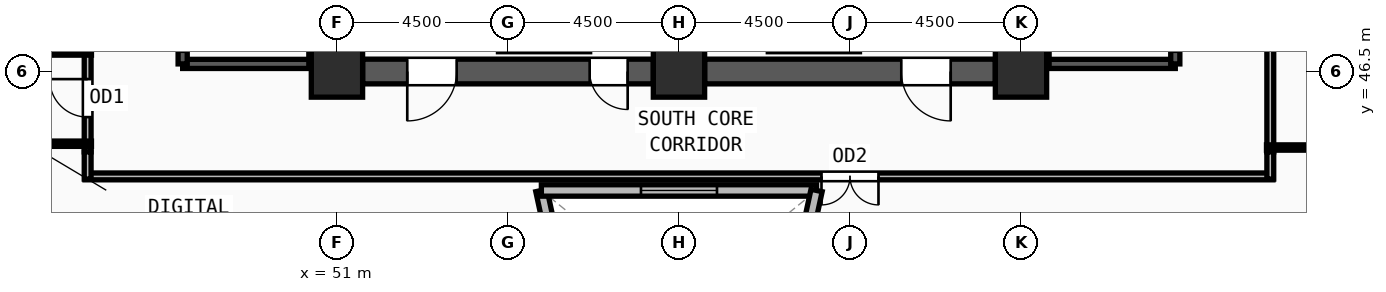
"""IFC4 building model, lengths in metres.
Left out: names, types, materials, properties, quantities, classifications, styles, units other than length and angle.
Written with IfcOpenShell. Run it as: python <this file> out.ifc"""

import sys

from ifc_helpers import new_model, si_unit, direction, frame, frame_2d, origin, origin_2d, place, context, subcontext, project, spatial, rectangle, extrude, source, transform, mapped, element, fill, save


model = new_model("IFC4")
c1 = context("Model", 3, precision=1e-05, world=origin(), true_north=direction((0.0, 1.0)))
c2 = subcontext(c1, "Body", "Model", "MODEL_VIEW")
j1 = project(units=[si_unit("LENGTHUNIT", "METRE"), si_unit("PLANEANGLEUNIT", "RADIAN")], contexts=[c1])
p1 = place(None, origin())
s1 = spatial("IfcSite", under=j1, at=p1, CompositionType="ELEMENT")
p2 = place(p1, origin())
s2 = spatial("IfcBuilding", under=s1, at=p2, CompositionType="ELEMENT")
p3 = place(p2, frame((0.0, 0.0, 258.75)))
s3 = spatial("IfcBuildingStorey", under=s2, at=p3, CompositionType="ELEMENT", Elevation=258.75)
m1 = source(origin(), c2, "Body", "SweptSolid", [
    extrude(rectangle(XDim=1.35, YDim=1.35, at=origin_2d()), origin(), (0.0, 0.0, 1.0), 3.75),
])
for number, where, z_axis, x_axis in (
    (1, (51.0, 46.5, 0.0), (0.0, 0.0, 1.0), (1.0, 0.0, 0.0)),
    (2, (60.0, 46.5, 0.0), (0.0, 0.0, 1.0), (1.0, 0.0, 0.0)),
    (3, (69.0, 46.5, 0.0), (0.0, 0.0, 1.0), (1.0, 0.0, 0.0)),
):
    element("IfcColumn", number, at=place(p3, frame(where, z_axis=z_axis, x_axis=x_axis)), inside=s3, PredefinedType="COLUMN", context=c2, shape_type="MappedRepresentation", body=[
        mapped(m1, transform((0.0, 0.0, 0.0), x_axis=(1.0, 0.0, 0.0), y_axis=(0.0, 1.0, 0.0), z_axis=(0.0, 0.0, 1.0), scale=1.0)),
    ])
p4 = place(p3, frame((39.075, 44.026, 0.0), z_axis=(0.0, 0.0, 1.0), x_axis=(0.554862422202, -0.83194212084, 0.0)))
e4 = element("IfcWall", 4, at=p4, inside=s3, PredefinedType="SOLIDWALL", context=c2, shape_type="SweptSolid", body=[
    extrude(rectangle(XDim=27.782, YDim=0.38, at=frame_2d((13.891, 0.0))), origin(), (0.0, 0.0, 1.0), 3.57),
])
m2 = source(origin(), c2, "Body", "SweptSolid", [
    extrude(rectangle(XDim=1.5, YDim=1.9, at=frame_2d((0.75, 0.95))), frame((0.0, 0.2, 0.0), z_axis=(0.0, -1.0, 0.0), x_axis=(1.0, 0.0, 0.0)), (0.0, 0.0, 1.0), 0.4),
])
p5 = place(p4, frame((6.195, 0.0, 0.55)))
e5 = element("IfcOpeningElement", 5, at=p5, cuts=e4, PredefinedType="OPENING", context=c2, shape_type="MappedRepresentation", body=[
    mapped(m2, transform((0.0, 0.0, 0.0), x_axis=(1.0, 0.0, 0.0), y_axis=(0.0, 1.0, 0.0), z_axis=(0.0, 0.0, 1.0), scale=1.0)),
])
p6 = place(p4, frame((13.141, 0.0, 0.55)))
e6 = element("IfcOpeningElement", 6, at=p6, cuts=e4, PredefinedType="OPENING", context=c2, shape_type="MappedRepresentation", body=[
    mapped(m2, transform((0.0, 0.0, 0.0), x_axis=(1.0, 0.0, 0.0), y_axis=(0.0, 1.0, 0.0), z_axis=(0.0, 0.0, 1.0), scale=1.0)),
])
p7 = place(p4, frame((20.086, 0.0, 0.55)))
e7 = element("IfcOpeningElement", 7, at=p7, cuts=e4, PredefinedType="OPENING", context=c2, shape_type="MappedRepresentation", body=[
    mapped(m2, transform((0.0, 0.0, 0.0), x_axis=(1.0, 0.0, 0.0), y_axis=(0.0, 1.0, 0.0), z_axis=(0.0, 0.0, 1.0), scale=1.0)),
])
p8 = place(p3, frame((68.325, 46.5, 0.0), z_axis=(0.0, 0.0, 1.0), x_axis=(-1.0, 0.0, 0.0)))
e8 = element("IfcWall", 8, at=p8, inside=s3, PredefinedType="SHEAR", context=c2, shape_type="SweptSolid", body=[
    extrude(rectangle(XDim=7.65, YDim=0.65, at=frame_2d((3.825, 0.0))), origin(), (0.0, 0.0, 1.0), 3.57),
])
m3 = source(origin(), c2, "Body", "SweptSolid", [
    extrude(rectangle(XDim=1.3, YDim=2.2, at=frame_2d((0.65, 1.1))), frame((0.0, 0.335, 0.0), z_axis=(0.0, -1.0, 0.0), x_axis=(1.0, 0.0, 0.0)), (0.0, 0.0, 1.0), 0.67),
])
p9 = place(p8, frame((1.175, 0.0, 0.0)))
e9 = element("IfcOpeningElement", 9, at=p9, cuts=e8, PredefinedType="OPENING", context=c2, shape_type="MappedRepresentation", body=[
    mapped(m3, transform((0.0, 0.0, 0.0), x_axis=(1.0, 0.0, 0.0), y_axis=(0.0, 1.0, 0.0), z_axis=(0.0, 0.0, 1.0), scale=1.0)),
])
p10 = place(p3, frame((59.325, 46.5, 0.0), z_axis=(0.0, 0.0, 1.0), x_axis=(-1.0, 0.0, 0.0)))
e10 = element("IfcWall", 10, at=p10, inside=s3, PredefinedType="SHEAR", context=c2, shape_type="SweptSolid", body=[
    extrude(rectangle(XDim=7.65, YDim=0.65, at=frame_2d((3.825, 0.0))), origin(), (0.0, 0.0, 1.0), 3.57),
])
p11 = place(p10, frame((5.175, 0.0, 0.0)))
e11 = element("IfcOpeningElement", 11, at=p11, cuts=e10, PredefinedType="OPENING", context=c2, shape_type="MappedRepresentation", body=[
    mapped(m3, transform((0.0, 0.0, 0.0), x_axis=(1.0, 0.0, 0.0), y_axis=(0.0, 1.0, 0.0), z_axis=(0.0, 0.0, 1.0), scale=1.0)),
])
m4 = source(origin(), c2, "Body", "SweptSolid", [
    extrude(rectangle(XDim=1.0, YDim=2.2, at=frame_2d((0.5, 1.1))), frame((0.0, 0.335, 0.0), z_axis=(0.0, -1.0, 0.0), x_axis=(1.0, 0.0, 0.0)), (0.0, 0.0, 1.0), 0.67),
])
p12 = place(p10, frame((0.675, 0.0, 0.0)))
e12 = element("IfcOpeningElement", 12, at=p12, cuts=e10, PredefinedType="OPENING", context=c2, shape_type="MappedRepresentation", body=[
    mapped(m4, transform((0.0, 0.0, 0.0), x_axis=(1.0, 0.0, 0.0), y_axis=(0.0, 1.0, 0.0), z_axis=(0.0, 0.0, 1.0), scale=1.0)),
])
p13 = place(p3, frame((46.94, 46.7, 0.0), z_axis=(0.0, 0.0, 1.0), x_axis=(1.0, 0.0, 0.0)))
e13 = element("IfcWall", 13, at=p13, inside=s3, PredefinedType="SOLIDWALL", context=c2, shape_type="SweptSolid", body=[
    extrude(rectangle(XDim=3.44, YDim=0.24, at=frame_2d((1.72, 0.0))), origin(), (0.0, 0.0, 1.0), 3.57),
])
p14 = place(p3, frame((50.38, 46.7, 0.0), z_axis=(0.0, 0.0, 1.0), x_axis=(0.0, 1.0, 0.0)))
e14 = element("IfcWall", 14, at=p14, inside=s3, PredefinedType="SOLIDWALL", context=c2, shape_type="SweptSolid", body=[
    extrude(rectangle(XDim=7.82, YDim=0.24, at=frame_2d((3.91, 0.0))), origin(), (0.0, 0.0, 1.0), 3.57),
])
p15 = place(p3, frame((46.94, 54.52, 0.0), z_axis=(0.0, 0.0, 1.0), x_axis=(0.0, -1.0, 0.0)))
e15 = element("IfcWall", 15, at=p15, inside=s3, PredefinedType="SOLIDWALL", context=c2, shape_type="SweptSolid", body=[
    extrude(rectangle(XDim=7.82, YDim=0.24, at=frame_2d((3.91, 0.0))), origin(), (0.0, 0.0, 1.0), 3.57),
])
m5 = source(origin(), c2, "Body", "SweptSolid", [
    extrude(rectangle(XDim=1.2, YDim=2.2, at=frame_2d((0.6, 1.1))), frame((0.0, 0.13, 0.0), z_axis=(0.0, -1.0, 0.0), x_axis=(1.0, 0.0, 0.0)), (0.0, 0.0, 1.0), 0.26),
])
p16 = place(p15, frame((6.3, 0.0, 0.0)))
e16 = element("IfcOpeningElement", 16, at=p16, cuts=e15, PredefinedType="OPENING", context=c2, shape_type="MappedRepresentation", body=[
    mapped(m5, transform((0.0, 0.0, 0.0), x_axis=(1.0, 0.0, 0.0), y_axis=(0.0, 1.0, 0.0), z_axis=(0.0, 0.0, 1.0), scale=1.0)),
])
p17 = place(p3, frame((69.62, 46.7, 0.0), z_axis=(0.0, 0.0, 1.0), x_axis=(1.0, 0.0, 0.0)))
e17 = element("IfcWall", 17, at=p17, inside=s3, PredefinedType="SOLIDWALL", context=c2, shape_type="SweptSolid", body=[
    extrude(rectangle(XDim=3.44, YDim=0.24, at=frame_2d((1.72, 0.0))), origin(), (0.0, 0.0, 1.0), 3.57),
])
p18 = place(p3, frame((73.06, 46.7, 0.0), z_axis=(0.0, 0.0, 1.0), x_axis=(0.0, 1.0, 0.0)))
e18 = element("IfcWall", 18, at=p18, inside=s3, PredefinedType="SOLIDWALL", context=c2, shape_type="SweptSolid", body=[
    extrude(rectangle(XDim=7.82, YDim=0.24, at=frame_2d((3.91, 0.0))), origin(), (0.0, 0.0, 1.0), 3.57),
])
p19 = place(p18, frame((0.32, 0.0, 0.0)))
e19 = element("IfcOpeningElement", 19, at=p19, cuts=e18, PredefinedType="OPENING", context=c2, shape_type="MappedRepresentation", body=[
    mapped(m5, transform((0.0, 0.0, 0.0), x_axis=(1.0, 0.0, 0.0), y_axis=(0.0, 1.0, 0.0), z_axis=(0.0, 0.0, 1.0), scale=1.0)),
])
p20 = place(p3, frame((69.62, 54.52, 0.0), z_axis=(0.0, 0.0, 1.0), x_axis=(0.0, -1.0, 0.0)))
e20 = element("IfcWall", 20, at=p20, inside=s3, PredefinedType="SOLIDWALL", context=c2, shape_type="SweptSolid", body=[
    extrude(rectangle(XDim=7.82, YDim=0.24, at=frame_2d((3.91, 0.0))), origin(), (0.0, 0.0, 1.0), 3.57),
])
p21 = place(p3, frame((57.646, 37.508, 0.0), z_axis=(0.0, 0.0, 1.0), x_axis=(-0.211271830319, 0.977427344468, 0.0)))
e21 = element("IfcWall", 21, at=p21, inside=s3, PredefinedType="SOLIDWALL", context=c2, shape_type="SweptSolid", body=[
    extrude(rectangle(XDim=5.998, YDim=0.3, at=frame_2d((2.999, 0.0))), origin(), (0.0, 0.0, 1.0), 3.57),
])
m6 = source(origin(), c2, "Body", "SweptSolid", [
    extrude(rectangle(XDim=2.0, YDim=1.9, at=frame_2d((1.0, 0.95))), frame((0.0, 0.16, 0.0), z_axis=(0.0, -1.0, 0.0), x_axis=(1.0, 0.0, 0.0)), (0.0, 0.0, 1.0), 0.32),
])
p22 = place(p21, frame((1.999, 0.0, 0.55)))
e22 = element("IfcOpeningElement", 22, at=p22, cuts=e21, PredefinedType="OPENING", context=c2, shape_type="MappedRepresentation", body=[
    mapped(m6, transform((0.0, 0.0, 0.0), x_axis=(1.0, 0.0, 0.0), y_axis=(0.0, 1.0, 0.0), z_axis=(0.0, 0.0, 1.0), scale=1.0)),
])
p23 = place(p3, frame((56.379, 43.37, 0.0), z_axis=(0.0, 0.0, 1.0), x_axis=(1.0, 0.0, 0.0)))
e23 = element("IfcWall", 23, at=p23, inside=s3, PredefinedType="SOLIDWALL", context=c2, shape_type="SweptSolid", body=[
    extrude(rectangle(XDim=7.242, YDim=0.3, at=frame_2d((3.621, 0.0))), origin(), (0.0, 0.0, 1.0), 3.57),
])
p24 = place(p23, frame((2.621, 0.0, 0.55)))
e24 = element("IfcOpeningElement", 24, at=p24, cuts=e23, PredefinedType="OPENING", context=c2, shape_type="MappedRepresentation", body=[
    mapped(m6, transform((0.0, 0.0, 0.0), x_axis=(1.0, 0.0, 0.0), y_axis=(0.0, 1.0, 0.0), z_axis=(0.0, 0.0, 1.0), scale=1.0)),
])
p25 = place(p3, frame((63.621, 43.37, 0.0), z_axis=(0.0, 0.0, 1.0), x_axis=(-0.211271830319, -0.977427344468, 0.0)))
e25 = element("IfcWall", 25, at=p25, inside=s3, PredefinedType="SOLIDWALL", context=c2, shape_type="SweptSolid", body=[
    extrude(rectangle(XDim=5.998, YDim=0.3, at=frame_2d((2.999, 0.0))), origin(), (0.0, 0.0, 1.0), 3.57),
])
p26 = place(p25, frame((1.999, 0.0, 0.55)))
e26 = element("IfcOpeningElement", 26, at=p26, cuts=e25, PredefinedType="OPENING", context=c2, shape_type="MappedRepresentation", body=[
    mapped(m6, transform((0.0, 0.0, 0.0), x_axis=(1.0, 0.0, 0.0), y_axis=(0.0, 1.0, 0.0), z_axis=(0.0, 0.0, 1.0), scale=1.0)),
])
p27 = place(p3, frame((44.44, 44.385, 0.0), z_axis=(0.0, 0.0, 1.0), x_axis=(0.0, 1.0, 0.0)))
e27 = element("IfcWall", 27, at=p27, inside=s3, PredefinedType="PARTITIONING", context=c2, shape_type="SweptSolid", body=[
    extrude(rectangle(XDim=2.83, YDim=0.18, at=frame_2d((1.415, 0.0))), origin(), (0.0, 0.0, 1.0), 3.57),
])
m7 = source(origin(), c2, "Body", "SweptSolid", [
    extrude(rectangle(XDim=1.0, YDim=2.2, at=frame_2d((0.5, 1.1))), frame((0.0, 0.1, 0.0), z_axis=(0.0, -1.0, 0.0), x_axis=(1.0, 0.0, 0.0)), (0.0, 0.0, 1.0), 0.2),
])
p28 = place(p27, frame((0.915, 0.0, 0.0)))
e28 = element("IfcOpeningElement", 28, at=p28, cuts=e27, PredefinedType="OPENING", context=c2, shape_type="MappedRepresentation", body=[
    mapped(m7, transform((0.0, 0.0, 0.0), x_axis=(1.0, 0.0, 0.0), y_axis=(0.0, 1.0, 0.0), z_axis=(0.0, 0.0, 1.0), scale=1.0)),
])
p29 = place(p3, frame((75.63, 43.74, 0.0), z_axis=(0.0, 0.0, 1.0), x_axis=(-1.0, 0.0, 0.0)))
e29 = element("IfcWall", 29, at=p29, inside=s3, PredefinedType="PARTITIONING", context=c2, shape_type="SweptSolid", body=[
    extrude(rectangle(XDim=31.26, YDim=0.18, at=frame_2d((15.63, 0.0))), origin(), (0.0, 0.0, 1.0), 3.57),
])
m8 = source(origin(), c2, "Body", "SweptSolid", [
    extrude(rectangle(XDim=1.5, YDim=2.2, at=frame_2d((0.75, 1.1))), frame((0.0, 0.1, 0.0), z_axis=(0.0, -1.0, 0.0), x_axis=(1.0, 0.0, 0.0)), (0.0, 0.0, 1.0), 0.2),
])
p30 = place(p29, frame((10.38, 0.0, 0.0)))
e30 = element("IfcOpeningElement", 30, at=p30, cuts=e29, PredefinedType="OPENING", context=c2, shape_type="MappedRepresentation", body=[
    mapped(m8, transform((0.0, 0.0, 0.0), x_axis=(1.0, 0.0, 0.0), y_axis=(0.0, 1.0, 0.0), z_axis=(0.0, 0.0, 1.0), scale=1.0)),
])
p31 = place(p3, frame((75.56, 52.285, 0.0), z_axis=(0.0, 0.0, 1.0), x_axis=(0.0, -1.0, 0.0)))
e31 = element("IfcWall", 31, at=p31, inside=s3, PredefinedType="PARTITIONING", context=c2, shape_type="SweptSolid", body=[
    extrude(rectangle(XDim=7.9, YDim=0.18, at=frame_2d((3.95, 0.0))), origin(), (0.0, 0.0, 1.0), 3.57),
])
p32 = place(p31, frame((3.45, 0.0, 0.0)))
e32 = element("IfcOpeningElement", 32, at=p32, cuts=e31, PredefinedType="OPENING", context=c2, shape_type="MappedRepresentation", body=[
    mapped(m7, transform((0.0, 0.0, 0.0), x_axis=(1.0, 0.0, 0.0), y_axis=(0.0, 1.0, 0.0), z_axis=(0.0, 0.0, 1.0), scale=1.0)),
])
for number, where, z_axis, x_axis in (
    (33, (44.44, 43.67, 0.0), (0.0, 0.0, 1.0), (0.0, 1.0, 0.0)),
    (34, (75.56, 44.385, 0.0), (0.0, 0.0, 1.0), (0.0, -1.0, 0.0)),
):
    element("IfcWall", number, at=place(p3, frame(where, z_axis=z_axis, x_axis=x_axis)), inside=s3, PredefinedType="PARTITIONING", context=c2, shape_type="SweptSolid", body=[
        extrude(rectangle(XDim=0.715, YDim=0.18, at=frame_2d((0.357, 0.0))), origin(), (0.0, 0.0, 1.0), 3.57),
    ])
p33 = place(p3, frame((44.54, 44.6, 0.0), z_axis=(0.0, 0.0, 1.0), x_axis=(-1.0, 0.0, 0.0)))
e35 = element("IfcWall", 35, at=p33, inside=s3, PredefinedType="PARTITIONING", context=c2, shape_type="SweptSolid", body=[
    extrude(rectangle(XDim=6.534, YDim=0.14, at=frame_2d((3.267, 0.0))), origin(), (0.0, 0.0, 1.0), 3.57),
])
p34 = place(p3, frame((44.54, 47.0, 0.0), z_axis=(0.0, 0.0, 1.0), x_axis=(-1.0, 0.0, 0.0)))
e36 = element("IfcWall", 36, at=p34, inside=s3, PredefinedType="PARTITIONING", context=c2, shape_type="SweptSolid", body=[
    extrude(rectangle(XDim=7.683, YDim=0.14, at=frame_2d((3.842, 0.0))), origin(), (0.0, 0.0, 1.0), 3.57),
])
p35 = place(p3, frame((75.46, 44.5, 0.0), z_axis=(0.0, 0.0, 1.0), x_axis=(1.0, 0.0, 0.0)))
e37 = element("IfcWall", 37, at=p35, inside=s3, PredefinedType="PARTITIONING", context=c2, shape_type="SweptSolid", body=[
    extrude(rectangle(XDim=6.14, YDim=0.14, at=frame_2d((3.07, 0.0))), origin(), (0.0, 0.0, 1.0), 3.57),
])
m9 = source(origin(), c2, "Body", "SweptSolid", [
    extrude(rectangle(XDim=1.3, YDim=2.2, at=frame_2d((0.65, 1.1))), frame((0.0, 0.025, 0.0), z_axis=(0.0, -1.0, 0.0), x_axis=(1.0, 0.0, 0.0)), (0.0, 0.0, 1.0), 0.05),
])
p36 = place(p11, origin())
e38 = element("IfcDoor", 38, at=p36, inside=s3, OperationType="SINGLE_SWING_RIGHT", PredefinedType="DOOR", context=c2, shape_type="MappedRepresentation", body=[
    mapped(m9, transform((0.0, 0.0, 0.0), x_axis=(1.0, 0.0, 0.0), y_axis=(0.0, 1.0, 0.0), z_axis=(0.0, 0.0, 1.0), scale=1.0)),
])
fill(e11, e38)
m10 = source(origin(), c2, "Body", "SweptSolid", [
    extrude(rectangle(XDim=1.0, YDim=2.2, at=frame_2d((0.5, 1.1))), frame((0.0, 0.025, 0.0), z_axis=(0.0, -1.0, 0.0), x_axis=(1.0, 0.0, 0.0)), (0.0, 0.0, 1.0), 0.05),
])
p37 = place(p12, origin())
e39 = element("IfcDoor", 39, at=p37, inside=s3, OperationType="SINGLE_SWING_LEFT", PredefinedType="DOOR", context=c2, shape_type="MappedRepresentation", body=[
    mapped(m10, transform((0.0, 0.0, 0.0), x_axis=(1.0, 0.0, 0.0), y_axis=(0.0, 1.0, 0.0), z_axis=(0.0, 0.0, 1.0), scale=1.0)),
])
fill(e12, e39)
p38 = place(p9, origin())
e40 = element("IfcDoor", 40, at=p38, inside=s3, OperationType="SINGLE_SWING_LEFT", PredefinedType="DOOR", context=c2, shape_type="MappedRepresentation", body=[
    mapped(m9, transform((0.0, 0.0, 0.0), x_axis=(1.0, 0.0, 0.0), y_axis=(0.0, 1.0, 0.0), z_axis=(0.0, 0.0, 1.0), scale=1.0)),
])
fill(e9, e40)
m11 = source(origin(), c2, "Body", "SweptSolid", [
    extrude(rectangle(XDim=2.0, YDim=1.9, at=frame_2d((1.0, 0.95))), frame((0.0, 0.03, 0.0), z_axis=(0.0, -1.0, 0.0), x_axis=(1.0, 0.0, 0.0)), (0.0, 0.0, 1.0), 0.06),
])
p39 = place(p24, origin())
e41 = element("IfcWindow", 41, at=p39, inside=s3, PartitioningType="DOUBLE_PANEL_VERTICAL", PredefinedType="WINDOW", context=c2, shape_type="MappedRepresentation", body=[
    mapped(m11, transform((0.0, 0.0, 0.0), x_axis=(1.0, 0.0, 0.0), y_axis=(0.0, 1.0, 0.0), z_axis=(0.0, 0.0, 1.0), scale=1.0)),
])
fill(e24, e41)
p40 = place(p28, origin())
e42 = element("IfcDoor", 42, at=p40, inside=s3, OperationType="SINGLE_SWING_RIGHT", PredefinedType="DOOR", context=c2, shape_type="MappedRepresentation", body=[
    mapped(m10, transform((0.0, 0.0, 0.0), x_axis=(1.0, 0.0, 0.0), y_axis=(0.0, 1.0, 0.0), z_axis=(0.0, 0.0, 1.0), scale=1.0)),
])
fill(e28, e42)
m12 = source(origin(), c2, "Body", "SweptSolid", [
    extrude(rectangle(XDim=1.5, YDim=2.2, at=frame_2d((0.75, 1.1))), frame((0.0, 0.025, 0.0), z_axis=(0.0, -1.0, 0.0), x_axis=(1.0, 0.0, 0.0)), (0.0, 0.0, 1.0), 0.05),
])
p41 = place(p30, origin())
e43 = element("IfcDoor", 43, at=p41, inside=s3, OperationType="DOUBLE_DOOR_SINGLE_SWING", PredefinedType="DOOR", context=c2, shape_type="MappedRepresentation", body=[
    mapped(m12, transform((0.0, 0.0, 0.0), x_axis=(1.0, 0.0, 0.0), y_axis=(0.0, 1.0, 0.0), z_axis=(0.0, 0.0, 1.0), scale=1.0)),
])
fill(e30, e43)
save(model, sys.argv[1])
